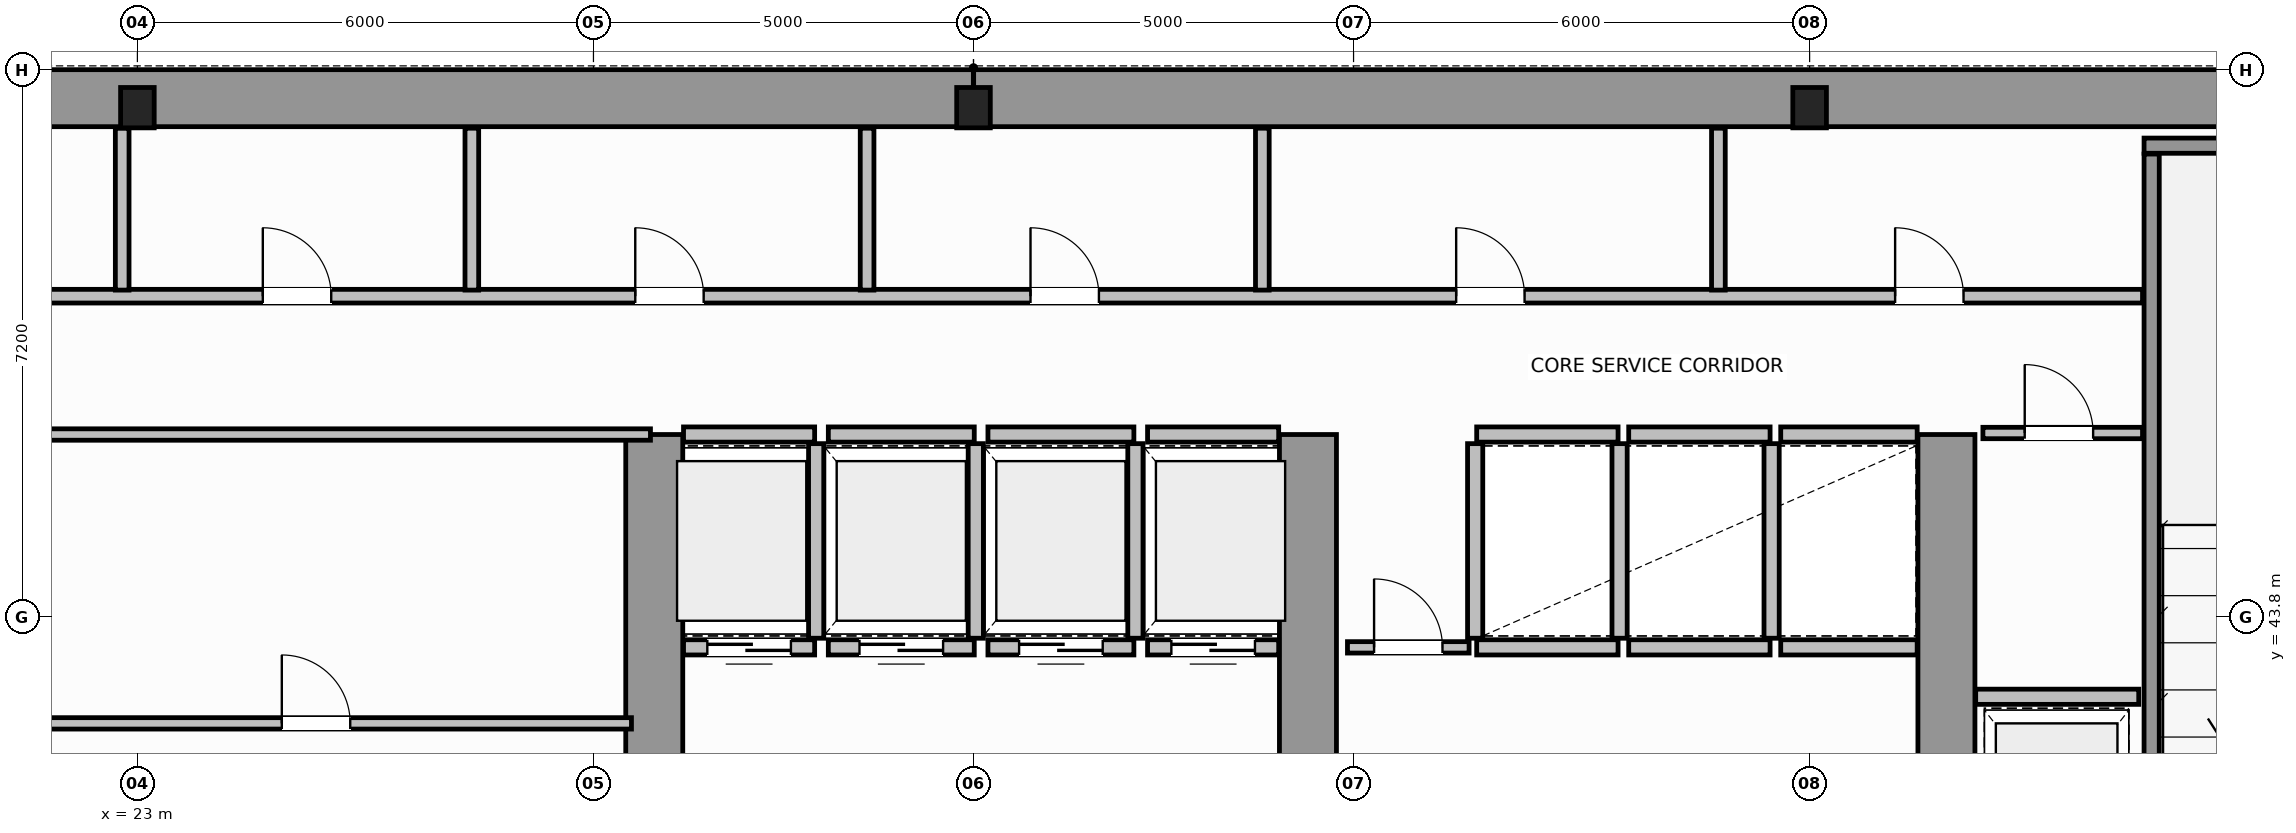
"""IFC4 building model, lengths in metres.
Left out: names, types, materials, properties, quantities, classifications, styles, units other than length and angle.
Written with IfcOpenShell. Run it as: python <this file> out.ifc"""

import sys

from ifc_helpers import new_model, si_unit, direction, frame, frame_2d, origin, origin_2d, place, context, subcontext, project, spatial, rectangle, i_section, extrude, source, transform, mapped, element, fill, save


model = new_model("IFC4")
c1 = context("Model", 3, precision=1e-05, world=origin(), true_north=direction((0.0, 1.0)))
c2 = subcontext(c1, "Body", "Model", "MODEL_VIEW")
j1 = project(units=[si_unit("LENGTHUNIT", "METRE"), si_unit("PLANEANGLEUNIT", "RADIAN")], contexts=[c1])
p1 = place(None, origin())
s1 = spatial("IfcSite", under=j1, at=p1, CompositionType="ELEMENT")
p2 = place(p1, origin())
s2 = spatial("IfcBuilding", under=s1, at=p2, CompositionType="ELEMENT")
p3 = place(p2, frame((0.0, 0.0, 111.0)))
s3 = spatial("IfcBuildingStorey", under=s2, at=p3, CompositionType="ELEMENT", Elevation=111.0)
m1 = source(origin(), c2, "Body", "SweptSolid", [
    extrude(i_section(OverallWidth=0.442, OverallDepth=0.531, WebThickness=0.065, FlangeThickness=0.076, FilletRadius=0.015, at=origin_2d()), origin(), (0.0, 0.0, 1.0), 3.8),
])
for number, where, z_axis, x_axis in (
    (1, (23.0, 50.5, 0.0), (0.0, 0.0, 1.0), (1.0, 0.0, 0.0)),
    (2, (34.0, 50.5, 0.0), (0.0, 0.0, 1.0), (1.0, 0.0, 0.0)),
    (3, (45.0, 50.5, 0.0), (0.0, 0.0, 1.0), (1.0, 0.0, 0.0)),
):
    element("IfcColumn", number, at=place(p3, frame(where, z_axis=z_axis, x_axis=x_axis)), inside=s3, PredefinedType="COLUMN", context=c2, shape_type="MappedRepresentation", body=[
        mapped(m1, transform((0.0, 0.0, 0.0), scale=1.0)),
    ])
for number, where, z_axis, x_axis in (
    (4, (14.379, 50.625, 0.0), (0.0, 0.0, 1.0), (1.0, 0.0, 0.0)),
    (5, (34.002, 50.625, 0.0), (0.0, 0.0, 1.0), (1.0, 0.0, 0.0)),
):
    element("IfcWall", number, at=place(p3, frame(where, z_axis=z_axis, x_axis=x_axis)), inside=s3, PredefinedType="SHEAR", context=c2, shape_type="SweptSolid", body=[
        extrude(rectangle(XDim=19.619, YDim=0.75, at=frame_2d((9.81, 0.0))), origin(), (0.0, 0.0, 1.0), 3.8),
    ])
for number, where, z_axis, x_axis in (
    (6, (29.8, 36.895, 0.0), (0.0, 0.0, 1.0), (0.0, 1.0, 0.0)),
    (7, (38.4, 36.895, 0.0), (0.0, 0.0, 1.0), (0.0, 1.0, 0.0)),
    (8, (46.8, 36.895, 0.0), (0.0, 0.0, 1.0), (0.0, 1.0, 0.0)),
):
    element("IfcWall", number, at=place(p3, frame(where, z_axis=z_axis, x_axis=x_axis)), inside=s3, PredefinedType="SHEAR", context=c2, shape_type="SweptSolid", body=[
        extrude(rectangle(XDim=9.305, YDim=0.75, at=frame_2d((4.652, 0.0))), origin(), (0.0, 0.0, 1.0), 3.8),
    ])
p4 = place(p3, frame((49.4, 50.0, 0.0), z_axis=(0.0, 0.0, 1.0), x_axis=(1.0, 0.0, 0.0)))
e9 = element("IfcWall", 9, at=p4, inside=s3, PredefinedType="SOLIDWALL", context=c2, shape_type="SweptSolid", body=[
    extrude(rectangle(XDim=4.225, YDim=0.2, at=frame_2d((2.113, 0.0))), origin(), (0.0, 0.0, 1.0), 3.8),
])
p5 = place(p3, frame((49.5, 39.96, 0.0), z_axis=(0.0, 0.0, 1.0), x_axis=(0.0, 1.0, 0.0)))
e10 = element("IfcWall", 10, at=p5, inside=s3, PredefinedType="SOLIDWALL", context=c2, shape_type="SweptSolid", body=[
    extrude(rectangle(XDim=9.93, YDim=0.2, at=frame_2d((4.965, 0.0))), origin(), (0.0, 0.0, 1.0), 3.8),
])
p6 = place(p3, frame((30.185, 43.4, 0.0), z_axis=(0.0, 0.0, 1.0), x_axis=(1.0, 0.0, 0.0)))
e11 = element("IfcWall", 11, at=p6, inside=s3, PredefinedType="SOLIDWALL", context=c2, shape_type="SweptSolid", body=[
    extrude(rectangle(XDim=1.725, YDim=0.2, at=frame_2d((0.862, 0.0))), origin(), (0.0, 0.0, 1.0), 3.58),
])
p7 = place(p6, frame((0.313, 0.0, 0.0)))
e12 = element("IfcOpeningElement", 12, at=p7, cuts=e11, PredefinedType="OPENING", context=c2, shape_type="SweptSolid", body=[
    extrude(rectangle(XDim=1.1, YDim=2.15, at=frame_2d((0.55, 1.075))), frame((0.0, 0.11, 0.0), z_axis=(0.0, -1.0, 0.0), x_axis=(1.0, 0.0, 0.0)), (0.0, 0.0, 1.0), 0.22),
])
p8 = place(p3, frame((30.185, 46.2, 0.0), z_axis=(0.0, 0.0, 1.0), x_axis=(1.0, 0.0, 0.0)))
e13 = element("IfcWall", 13, at=p8, inside=s3, PredefinedType="SOLIDWALL", context=c2, shape_type="SweptSolid", body=[
    extrude(rectangle(XDim=1.725, YDim=0.2, at=frame_2d((0.862, 0.0))), origin(), (0.0, 0.0, 1.0), 3.58),
])
p9 = place(p3, frame((31.93, 43.52, 0.0), z_axis=(0.0, 0.0, 1.0), x_axis=(0.0, 1.0, 0.0)))
e14 = element("IfcWall", 14, at=p9, inside=s3, PredefinedType="SOLIDWALL", context=c2, shape_type="SweptSolid", body=[
    extrude(rectangle(XDim=2.56, YDim=0.2, at=frame_2d((1.28, 0.0))), origin(), (0.0, 0.0, 1.0), 3.58),
])
p10 = place(p3, frame((32.09, 43.4, 0.0), z_axis=(0.0, 0.0, 1.0), x_axis=(1.0, 0.0, 0.0)))
e15 = element("IfcWall", 15, at=p10, inside=s3, PredefinedType="SOLIDWALL", context=c2, shape_type="SweptSolid", body=[
    extrude(rectangle(XDim=1.92, YDim=0.2, at=frame_2d((0.96, 0.0))), origin(), (0.0, 0.0, 1.0), 3.58),
])
p11 = place(p10, frame((0.41, 0.0, 0.0)))
e16 = element("IfcOpeningElement", 16, at=p11, cuts=e15, PredefinedType="OPENING", context=c2, shape_type="SweptSolid", body=[
    extrude(rectangle(XDim=1.1, YDim=2.15, at=frame_2d((0.55, 1.075))), frame((0.0, 0.11, 0.0), z_axis=(0.0, -1.0, 0.0), x_axis=(1.0, 0.0, 0.0)), (0.0, 0.0, 1.0), 0.22),
])
p12 = place(p3, frame((32.09, 46.2, 0.0), z_axis=(0.0, 0.0, 1.0), x_axis=(1.0, 0.0, 0.0)))
e17 = element("IfcWall", 17, at=p12, inside=s3, PredefinedType="SOLIDWALL", context=c2, shape_type="SweptSolid", body=[
    extrude(rectangle(XDim=1.92, YDim=0.2, at=frame_2d((0.96, 0.0))), origin(), (0.0, 0.0, 1.0), 3.58),
])
p13 = place(p3, frame((34.03, 43.52, 0.0), z_axis=(0.0, 0.0, 1.0), x_axis=(0.0, 1.0, 0.0)))
e18 = element("IfcWall", 18, at=p13, inside=s3, PredefinedType="SOLIDWALL", context=c2, shape_type="SweptSolid", body=[
    extrude(rectangle(XDim=2.56, YDim=0.2, at=frame_2d((1.28, 0.0))), origin(), (0.0, 0.0, 1.0), 3.58),
])
p14 = place(p3, frame((34.19, 43.4, 0.0), z_axis=(0.0, 0.0, 1.0), x_axis=(1.0, 0.0, 0.0)))
e19 = element("IfcWall", 19, at=p14, inside=s3, PredefinedType="SOLIDWALL", context=c2, shape_type="SweptSolid", body=[
    extrude(rectangle(XDim=1.92, YDim=0.2, at=frame_2d((0.96, 0.0))), origin(), (0.0, 0.0, 1.0), 3.58),
])
p15 = place(p14, frame((0.41, 0.0, 0.0)))
e20 = element("IfcOpeningElement", 20, at=p15, cuts=e19, PredefinedType="OPENING", context=c2, shape_type="SweptSolid", body=[
    extrude(rectangle(XDim=1.1, YDim=2.15, at=frame_2d((0.55, 1.075))), frame((0.0, 0.11, 0.0), z_axis=(0.0, -1.0, 0.0), x_axis=(1.0, 0.0, 0.0)), (0.0, 0.0, 1.0), 0.22),
])
p16 = place(p3, frame((34.19, 46.2, 0.0), z_axis=(0.0, 0.0, 1.0), x_axis=(1.0, 0.0, 0.0)))
e21 = element("IfcWall", 21, at=p16, inside=s3, PredefinedType="SOLIDWALL", context=c2, shape_type="SweptSolid", body=[
    extrude(rectangle(XDim=1.92, YDim=0.2, at=frame_2d((0.96, 0.0))), origin(), (0.0, 0.0, 1.0), 3.58),
])
p17 = place(p3, frame((36.13, 43.52, 0.0), z_axis=(0.0, 0.0, 1.0), x_axis=(0.0, 1.0, 0.0)))
e22 = element("IfcWall", 22, at=p17, inside=s3, PredefinedType="SOLIDWALL", context=c2, shape_type="SweptSolid", body=[
    extrude(rectangle(XDim=2.56, YDim=0.2, at=frame_2d((1.28, 0.0))), origin(), (0.0, 0.0, 1.0), 3.58),
])
p18 = place(p3, frame((36.29, 43.4, 0.0), z_axis=(0.0, 0.0, 1.0), x_axis=(1.0, 0.0, 0.0)))
e23 = element("IfcWall", 23, at=p18, inside=s3, PredefinedType="SOLIDWALL", context=c2, shape_type="SweptSolid", body=[
    extrude(rectangle(XDim=1.725, YDim=0.2, at=frame_2d((0.862, 0.0))), origin(), (0.0, 0.0, 1.0), 3.58),
])
p19 = place(p18, frame((0.313, 0.0, 0.0)))
e24 = element("IfcOpeningElement", 24, at=p19, cuts=e23, PredefinedType="OPENING", context=c2, shape_type="SweptSolid", body=[
    extrude(rectangle(XDim=1.1, YDim=2.15, at=frame_2d((0.55, 1.075))), frame((0.0, 0.11, 0.0), z_axis=(0.0, -1.0, 0.0), x_axis=(1.0, 0.0, 0.0)), (0.0, 0.0, 1.0), 0.22),
])
p20 = place(p3, frame((36.29, 46.2, 0.0), z_axis=(0.0, 0.0, 1.0), x_axis=(1.0, 0.0, 0.0)))
e25 = element("IfcWall", 25, at=p20, inside=s3, PredefinedType="SOLIDWALL", context=c2, shape_type="SweptSolid", body=[
    extrude(rectangle(XDim=1.725, YDim=0.2, at=frame_2d((0.862, 0.0))), origin(), (0.0, 0.0, 1.0), 3.58),
])
for number, where, z_axis, x_axis in (
    (26, (40.62, 43.4, 0.0), (0.0, 0.0, 1.0), (1.0, 0.0, 0.0)),
    (27, (40.62, 46.2, 0.0), (0.0, 0.0, 1.0), (1.0, 0.0, 0.0)),
):
    element("IfcWall", number, at=place(p3, frame(where, z_axis=z_axis, x_axis=x_axis)), inside=s3, PredefinedType="SOLIDWALL", context=c2, shape_type="SweptSolid", body=[
        extrude(rectangle(XDim=1.86, YDim=0.2, at=frame_2d((0.93, 0.0))), origin(), (0.0, 0.0, 1.0), 3.58),
    ])
for number, where, z_axis, x_axis in (
    (28, (40.6, 43.52, 0.0), (0.0, 0.0, 1.0), (0.0, 1.0, 0.0)),
    (29, (42.5, 43.52, 0.0), (0.0, 0.0, 1.0), (0.0, 1.0, 0.0)),
):
    element("IfcWall", number, at=place(p3, frame(where, z_axis=z_axis, x_axis=x_axis)), inside=s3, PredefinedType="SOLIDWALL", context=c2, shape_type="SweptSolid", body=[
        extrude(rectangle(XDim=2.56, YDim=0.2, at=frame_2d((1.28, 0.0))), origin(), (0.0, 0.0, 1.0), 3.58),
    ])
for number, where, z_axis, x_axis in (
    (30, (42.62, 43.4, 0.0), (0.0, 0.0, 1.0), (1.0, 0.0, 0.0)),
    (31, (42.62, 46.2, 0.0), (0.0, 0.0, 1.0), (1.0, 0.0, 0.0)),
):
    element("IfcWall", number, at=place(p3, frame(where, z_axis=z_axis, x_axis=x_axis)), inside=s3, PredefinedType="SOLIDWALL", context=c2, shape_type="SweptSolid", body=[
        extrude(rectangle(XDim=1.86, YDim=0.2, at=frame_2d((0.93, 0.0))), origin(), (0.0, 0.0, 1.0), 3.58),
    ])
p21 = place(p3, frame((44.5, 43.52, 0.0), z_axis=(0.0, 0.0, 1.0), x_axis=(0.0, 1.0, 0.0)))
e32 = element("IfcWall", 32, at=p21, inside=s3, PredefinedType="SOLIDWALL", context=c2, shape_type="SweptSolid", body=[
    extrude(rectangle(XDim=2.56, YDim=0.2, at=frame_2d((1.28, 0.0))), origin(), (0.0, 0.0, 1.0), 3.58),
])
for number, where, z_axis, x_axis in (
    (33, (44.62, 43.4, 0.0), (0.0, 0.0, 1.0), (1.0, 0.0, 0.0)),
    (34, (44.62, 46.2, 0.0), (0.0, 0.0, 1.0), (1.0, 0.0, 0.0)),
):
    element("IfcWall", number, at=place(p3, frame(where, z_axis=z_axis, x_axis=x_axis)), inside=s3, PredefinedType="SOLIDWALL", context=c2, shape_type="SweptSolid", body=[
        extrude(rectangle(XDim=1.795, YDim=0.2, at=frame_2d((0.897, 0.0))), origin(), (0.0, 0.0, 1.0), 3.58),
    ])
p22 = place(p3, frame((47.185, 42.75, 0.0), z_axis=(0.0, 0.0, 1.0), x_axis=(1.0, 0.0, 0.0)))
e35 = element("IfcWall", 35, at=p22, inside=s3, PredefinedType="SOLIDWALL", context=c2, shape_type="SweptSolid", body=[
    extrude(rectangle(XDim=2.145, YDim=0.2, at=frame_2d((1.073, 0.0))), origin(), (0.0, 0.0, 1.0), 3.58),
])
p23 = place(p3, frame((21.25, 46.2, 0.0), z_axis=(0.0, 0.0, 1.0), x_axis=(1.0, 0.0, 0.0)))
e36 = element("IfcWall", 36, at=p23, inside=s3, PredefinedType="PARTITIONING", context=c2, shape_type="SweptSolid", body=[
    extrude(rectangle(XDim=8.5, YDim=0.15, at=frame_2d((4.25, 0.0))), origin(), (0.0, 0.0, 1.0), 3.58),
])
p24 = place(p3, frame((21.5, 42.4, 0.0), z_axis=(0.0, 0.0, 1.0), x_axis=(1.0, 0.0, 0.0)))
e37 = element("IfcWall", 37, at=p24, inside=s3, PredefinedType="PARTITIONING", context=c2, shape_type="SweptSolid", body=[
    extrude(rectangle(XDim=8.0, YDim=0.15, at=frame_2d((4.0, 0.0))), origin(), (0.0, 0.0, 1.0), 3.58),
])
p25 = place(p24, frame((3.4, 0.0, 0.0)))
e38 = element("IfcOpeningElement", 38, at=p25, cuts=e37, PredefinedType="OPENING", context=c2, shape_type="SweptSolid", body=[
    extrude(rectangle(XDim=0.9, YDim=2.1, at=frame_2d((0.45, 1.05))), frame((0.0, 0.085, 0.0), z_axis=(0.0, -1.0, 0.0), x_axis=(1.0, 0.0, 0.0)), (0.0, 0.0, 1.0), 0.17),
])
p26 = place(p3, frame((47.28, 46.22, 0.0), z_axis=(0.0, 0.0, 1.0), x_axis=(1.0, 0.0, 0.0)))
e39 = element("IfcWall", 39, at=p26, inside=s3, PredefinedType="PARTITIONING", context=c2, shape_type="SweptSolid", body=[
    extrude(rectangle(XDim=2.1, YDim=0.15, at=frame_2d((1.05, 0.0))), origin(), (0.0, 0.0, 1.0), 3.58),
])
p27 = place(p26, frame((0.55, 0.0, 0.0)))
e40 = element("IfcOpeningElement", 40, at=p27, cuts=e39, PredefinedType="OPENING", context=c2, shape_type="SweptSolid", body=[
    extrude(rectangle(XDim=0.9, YDim=2.1, at=frame_2d((0.45, 1.05))), frame((0.0, 0.085, 0.0), z_axis=(0.0, -1.0, 0.0), x_axis=(1.0, 0.0, 0.0)), (0.0, 0.0, 1.0), 0.17),
])
p28 = place(p3, frame((38.92, 43.4, 0.0), z_axis=(0.0, 0.0, 1.0), x_axis=(1.0, 0.0, 0.0)))
e41 = element("IfcWall", 41, at=p28, inside=s3, PredefinedType="PARTITIONING", context=c2, shape_type="SweptSolid", body=[
    extrude(rectangle(XDim=1.6, YDim=0.15, at=frame_2d((0.8, 0.0))), origin(), (0.0, 0.0, 1.0), 3.58),
])
p29 = place(p28, frame((0.35, 0.0, 0.0)))
e42 = element("IfcOpeningElement", 42, at=p29, cuts=e41, PredefinedType="OPENING", context=c2, shape_type="SweptSolid", body=[
    extrude(rectangle(XDim=0.9, YDim=2.1, at=frame_2d((0.45, 1.05))), frame((0.0, 0.085, 0.0), z_axis=(0.0, -1.0, 0.0), x_axis=(1.0, 0.0, 0.0)), (0.0, 0.0, 1.0), 0.17),
])
p30 = place(p3, frame((18.62, 48.02, 0.0), z_axis=(0.0, 0.0, 1.0), x_axis=(1.0, 0.0, 0.0)))
e43 = element("IfcWall", 43, at=p30, inside=s3, PredefinedType="PLUMBINGWALL", context=c2, shape_type="SweptSolid", body=[
    extrude(rectangle(XDim=30.76, YDim=0.18, at=frame_2d((15.38, 0.0))), origin(), (0.0, 0.0, 1.0), 3.58),
])
p31 = place(p30, frame((1.655, 0.0, 0.0)))
e44 = element("IfcOpeningElement", 44, at=p31, cuts=e43, PredefinedType="OPENING", context=c2, shape_type="SweptSolid", body=[
    extrude(rectangle(XDim=0.9, YDim=2.15, at=frame_2d((0.45, 1.075))), frame((0.0, 0.1, 0.0), z_axis=(0.0, -1.0, 0.0), x_axis=(1.0, 0.0, 0.0)), (0.0, 0.0, 1.0), 0.2),
])
p32 = place(p30, frame((6.03, 0.0, 0.0)))
e45 = element("IfcOpeningElement", 45, at=p32, cuts=e43, PredefinedType="OPENING", context=c2, shape_type="SweptSolid", body=[
    extrude(rectangle(XDim=0.9, YDim=2.15, at=frame_2d((0.45, 1.075))), frame((0.0, 0.1, 0.0), z_axis=(0.0, -1.0, 0.0), x_axis=(1.0, 0.0, 0.0)), (0.0, 0.0, 1.0), 0.2),
])
p33 = place(p30, frame((10.93, 0.0, 0.0)))
e46 = element("IfcOpeningElement", 46, at=p33, cuts=e43, PredefinedType="OPENING", context=c2, shape_type="SweptSolid", body=[
    extrude(rectangle(XDim=0.9, YDim=2.15, at=frame_2d((0.45, 1.075))), frame((0.0, 0.1, 0.0), z_axis=(0.0, -1.0, 0.0), x_axis=(1.0, 0.0, 0.0)), (0.0, 0.0, 1.0), 0.2),
])
p34 = place(p30, frame((16.13, 0.0, 0.0)))
e47 = element("IfcOpeningElement", 47, at=p34, cuts=e43, PredefinedType="OPENING", context=c2, shape_type="SweptSolid", body=[
    extrude(rectangle(XDim=0.9, YDim=2.15, at=frame_2d((0.45, 1.075))), frame((0.0, 0.1, 0.0), z_axis=(0.0, -1.0, 0.0), x_axis=(1.0, 0.0, 0.0)), (0.0, 0.0, 1.0), 0.2),
])
p35 = place(p30, frame((21.73, 0.0, 0.0)))
e48 = element("IfcOpeningElement", 48, at=p35, cuts=e43, PredefinedType="OPENING", context=c2, shape_type="SweptSolid", body=[
    extrude(rectangle(XDim=0.9, YDim=2.15, at=frame_2d((0.45, 1.075))), frame((0.0, 0.1, 0.0), z_axis=(0.0, -1.0, 0.0), x_axis=(1.0, 0.0, 0.0)), (0.0, 0.0, 1.0), 0.2),
])
p36 = place(p30, frame((27.505, 0.0, 0.0)))
e49 = element("IfcOpeningElement", 49, at=p36, cuts=e43, PredefinedType="OPENING", context=c2, shape_type="SweptSolid", body=[
    extrude(rectangle(XDim=0.9, YDim=2.15, at=frame_2d((0.45, 1.075))), frame((0.0, 0.1, 0.0), z_axis=(0.0, -1.0, 0.0), x_axis=(1.0, 0.0, 0.0)), (0.0, 0.0, 1.0), 0.2),
])
p37 = place(p3, frame((22.8, 48.1, 0.0), z_axis=(0.0, 0.0, 1.0), x_axis=(0.0, 1.0, 0.0)))
e50 = element("IfcWall", 50, at=p37, inside=s3, PredefinedType="PLUMBINGWALL", context=c2, shape_type="SweptSolid", body=[
    extrude(rectangle(XDim=2.13, YDim=0.18, at=frame_2d((1.065, 0.0))), origin(), (0.0, 0.0, 1.0), 2.87),
])
for number, where, z_axis, x_axis in (
    (51, (27.4, 48.1, 0.0), (0.0, 0.0, 1.0), (0.0, 1.0, 0.0)),
    (52, (32.6, 48.1, 0.0), (0.0, 0.0, 1.0), (0.0, 1.0, 0.0)),
    (53, (37.8, 48.1, 0.0), (0.0, 0.0, 1.0), (0.0, 1.0, 0.0)),
    (54, (43.8, 48.1, 0.0), (0.0, 0.0, 1.0), (0.0, 1.0, 0.0)),
):
    element("IfcWall", number, at=place(p3, frame(where, z_axis=z_axis, x_axis=x_axis)), inside=s3, PredefinedType="PLUMBINGWALL", context=c2, shape_type="SweptSolid", body=[
        extrude(rectangle(XDim=2.13, YDim=0.18, at=frame_2d((1.065, 0.0))), origin(), (0.0, 0.0, 1.0), 3.58),
    ])
m2 = source(origin(), c2, "Body", "SweptSolid", [
    extrude(rectangle(XDim=1.1, YDim=2.15, at=frame_2d((0.55, 1.075))), frame((0.0, 0.025, 0.0), z_axis=(0.0, -1.0, 0.0), x_axis=(1.0, 0.0, 0.0)), (0.0, 0.0, 1.0), 0.05),
])
p38 = place(p7, origin())
e55 = element("IfcDoor", 55, at=p38, inside=s3, OperationType="DOUBLE_DOOR_SLIDING", PredefinedType="DOOR", context=c2, shape_type="MappedRepresentation", body=[
    mapped(m2, transform((0.0, 0.0, 0.0), scale=1.0)),
])
fill(e12, e55)
p39 = place(p11, origin())
e56 = element("IfcDoor", 56, at=p39, inside=s3, OperationType="DOUBLE_DOOR_SLIDING", PredefinedType="DOOR", context=c2, shape_type="MappedRepresentation", body=[
    mapped(m2, transform((0.0, 0.0, 0.0), scale=1.0)),
])
fill(e16, e56)
p40 = place(p15, origin())
e57 = element("IfcDoor", 57, at=p40, inside=s3, OperationType="DOUBLE_DOOR_SLIDING", PredefinedType="DOOR", context=c2, shape_type="MappedRepresentation", body=[
    mapped(m2, transform((0.0, 0.0, 0.0), scale=1.0)),
])
fill(e20, e57)
p41 = place(p19, origin())
e58 = element("IfcDoor", 58, at=p41, inside=s3, OperationType="DOUBLE_DOOR_SLIDING", PredefinedType="DOOR", context=c2, shape_type="MappedRepresentation", body=[
    mapped(m2, transform((0.0, 0.0, 0.0), scale=1.0)),
])
fill(e24, e58)
m3 = source(origin(), c2, "Body", "SweptSolid", [
    extrude(rectangle(XDim=0.9, YDim=2.1, at=frame_2d((0.45, 1.05))), frame((0.0, 0.025, 0.0), z_axis=(0.0, -1.0, 0.0), x_axis=(1.0, 0.0, 0.0)), (0.0, 0.0, 1.0), 0.05),
])
p42 = place(p25, origin())
e59 = element("IfcDoor", 59, at=p42, inside=s3, OperationType="SINGLE_SWING_RIGHT", PredefinedType="DOOR", context=c2, shape_type="MappedRepresentation", body=[
    mapped(m3, transform((0.0, 0.0, 0.0), scale=1.0)),
])
fill(e38, e59)
p43 = place(p27, origin())
e60 = element("IfcDoor", 60, at=p43, inside=s3, OperationType="SINGLE_SWING_RIGHT", PredefinedType="DOOR", context=c2, shape_type="MappedRepresentation", body=[
    mapped(m3, transform((0.0, 0.0, 0.0), scale=1.0)),
])
fill(e40, e60)
p44 = place(p29, origin())
e61 = element("IfcDoor", 61, at=p44, inside=s3, OperationType="SINGLE_SWING_LEFT", PredefinedType="DOOR", context=c2, shape_type="MappedRepresentation", body=[
    mapped(m3, transform((0.0, 0.0, 0.0), scale=1.0)),
])
fill(e42, e61)
m4 = source(origin(), c2, "Body", "SweptSolid", [
    extrude(rectangle(XDim=0.9, YDim=2.15, at=frame_2d((0.45, 1.075))), frame((0.0, 0.025, 0.0), z_axis=(0.0, -1.0, 0.0), x_axis=(1.0, 0.0, 0.0)), (0.0, 0.0, 1.0), 0.05),
])
p45 = place(p32, origin())
e62 = element("IfcDoor", 62, at=p45, inside=s3, OperationType="SINGLE_SWING_RIGHT", PredefinedType="DOOR", context=c2, shape_type="MappedRepresentation", body=[
    mapped(m4, transform((0.0, 0.0, 0.0), scale=1.0)),
])
fill(e45, e62)
p46 = place(p33, origin())
e63 = element("IfcDoor", 63, at=p46, inside=s3, OperationType="SINGLE_SWING_LEFT", PredefinedType="DOOR", context=c2, shape_type="MappedRepresentation", body=[
    mapped(m4, transform((0.0, 0.0, 0.0), scale=1.0)),
])
fill(e46, e63)
p47 = place(p34, origin())
e64 = element("IfcDoor", 64, at=p47, inside=s3, OperationType="SINGLE_SWING_RIGHT", PredefinedType="DOOR", context=c2, shape_type="MappedRepresentation", body=[
    mapped(m4, transform((0.0, 0.0, 0.0), scale=1.0)),
])
fill(e47, e64)
p48 = place(p35, origin())
e65 = element("IfcDoor", 65, at=p48, inside=s3, OperationType="SINGLE_SWING_LEFT", PredefinedType="DOOR", context=c2, shape_type="MappedRepresentation", body=[
    mapped(m4, transform((0.0, 0.0, 0.0), scale=1.0)),
])
fill(e48, e65)
p49 = place(p36, origin())
e66 = element("IfcDoor", 66, at=p49, inside=s3, OperationType="SINGLE_SWING_RIGHT", PredefinedType="DOOR", context=c2, shape_type="MappedRepresentation", body=[
    mapped(m4, transform((0.0, 0.0, 0.0), scale=1.0)),
])
fill(e49, e66)
save(model, sys.argv[1])
